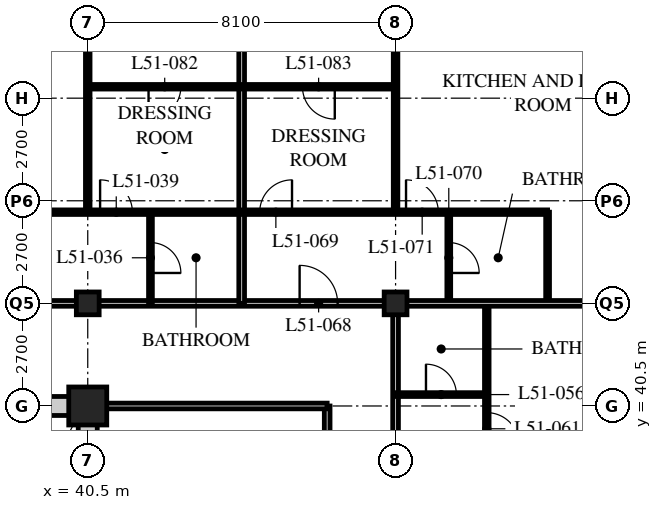
"""IFC4 building model, lengths in metres.
Left out: names, types, materials, properties, quantities, classifications, styles, units other than length and angle.
Written with IfcOpenShell. Run it as: python <this file> out.ifc"""

import sys

from ifc_helpers import new_model, si_unit, direction, frame, frame_2d, origin, origin_2d, place, context, subcontext, project, spatial, rectangle, hollow_rectangle, extrude, element, fill, save


model = new_model("IFC4")
c1 = context("Model", 3, precision=1e-05, world=origin(), true_north=direction((0.0, 1.0)))
c2 = subcontext(c1, "Body", "Model", "MODEL_VIEW")
j1 = project(units=[si_unit("LENGTHUNIT", "METRE"), si_unit("PLANEANGLEUNIT", "RADIAN")], contexts=[c1])
p1 = place(None, origin())
s1 = spatial("IfcSite", under=j1, at=p1, CompositionType="ELEMENT")
p2 = place(p1, origin())
s2 = spatial("IfcBuilding", under=s1, at=p2, CompositionType="ELEMENT")
p3 = place(p2, frame((0.0, 0.0, 199.2)))
s3 = spatial("IfcBuildingStorey", under=s2, at=p3, CompositionType="ELEMENT", Elevation=199.2)
p4 = place(p3, frame((40.5, 40.5, 0.0), z_axis=(0.0, 0.0, 1.0), x_axis=(1.0, 0.0, 0.0)))
e1 = element("IfcColumn", 1, at=p4, inside=s3, PredefinedType="COLUMN", context=c2, shape_type="SweptSolid", body=[
    extrude(hollow_rectangle(XDim=1.0, YDim=1.0, WallThickness=0.1, at=origin_2d()), origin(), (0.0, 0.0, 1.0), 3.6),
])
for number, where, z_axis, x_axis in (
    (2, (40.5, 43.2, 0.0), (0.0, 0.0, 1.0), (1.0, 0.0, 0.0)),
    (3, (48.6, 43.2, 0.0), (0.0, 0.0, 1.0), (1.0, 0.0, 0.0)),
):
    element("IfcColumn", number, at=place(p3, frame(where, z_axis=z_axis, x_axis=x_axis)), inside=s3, PredefinedType="COLUMN", context=c2, shape_type="SweptSolid", body=[
        extrude(hollow_rectangle(XDim=0.6, YDim=0.6, WallThickness=0.05, at=origin_2d()), origin(), (0.0, 0.0, 1.0), 3.6),
    ])
p5 = place(p3, frame((8.1, 43.2, 0.0), z_axis=(0.0, 0.0, 1.0), x_axis=(1.0, 0.0, 0.0)))
e4 = element("IfcWall", 4, at=p5, inside=s3, PredefinedType="PARTITIONING", context=c2, shape_type="SweptSolid", body=[
    extrude(rectangle(XDim=40.5, YDim=0.15, at=frame_2d((20.25, 0.0))), origin(), (0.0, 0.0, 1.0), 2.778),
])
p6 = place(p5, frame((4.45, 0.0, 0.0)))
e5 = element("IfcOpeningElement", 5, at=p6, cuts=e4, PredefinedType="OPENING", context=c2, shape_type="SweptSolid", body=[
    extrude(rectangle(XDim=1.0, YDim=2.1, at=frame_2d((0.5, 1.05))), frame((0.0, 0.085, 0.0), z_axis=(0.0, -1.0, 0.0), x_axis=(1.0, 0.0, 0.0)), (0.0, 0.0, 1.0), 0.17),
])
p7 = place(p5, frame((20.65, 0.0, 0.0)))
e6 = element("IfcOpeningElement", 6, at=p7, cuts=e4, PredefinedType="OPENING", context=c2, shape_type="SweptSolid", body=[
    extrude(rectangle(XDim=1.0, YDim=2.1, at=frame_2d((0.5, 1.05))), frame((0.0, 0.085, 0.0), z_axis=(0.0, -1.0, 0.0), x_axis=(1.0, 0.0, 0.0)), (0.0, 0.0, 1.0), 0.17),
])
p8 = place(p5, frame((28.75, 0.0, 0.0)))
e7 = element("IfcOpeningElement", 7, at=p8, cuts=e4, PredefinedType="OPENING", context=c2, shape_type="SweptSolid", body=[
    extrude(rectangle(XDim=1.0, YDim=2.1, at=frame_2d((0.5, 1.05))), frame((0.0, 0.085, 0.0), z_axis=(0.0, -1.0, 0.0), x_axis=(1.0, 0.0, 0.0)), (0.0, 0.0, 1.0), 0.17),
])
p9 = place(p5, frame((37.975, 0.0, 0.0)))
e8 = element("IfcOpeningElement", 8, at=p9, cuts=e4, PredefinedType="OPENING", context=c2, shape_type="SweptSolid", body=[
    extrude(rectangle(XDim=1.0, YDim=2.1, at=frame_2d((0.5, 1.05))), frame((0.0, 0.085, 0.0), z_axis=(0.0, -1.0, 0.0), x_axis=(1.0, 0.0, 0.0)), (0.0, 0.0, 1.0), 0.17),
])
p10 = place(p5, frame((1.525, 0.0, 0.0)))
e9 = element("IfcOpeningElement", 9, at=p10, cuts=e4, PredefinedType="OPENING", context=c2, shape_type="SweptSolid", body=[
    extrude(rectangle(XDim=1.0, YDim=2.1, at=frame_2d((0.5, 1.05))), frame((0.0, 0.085, 0.0), z_axis=(0.0, -1.0, 0.0), x_axis=(1.0, 0.0, 0.0)), (0.0, 0.0, 1.0), 0.17),
])
p11 = place(p3, frame((48.6, 18.9, 0.0), z_axis=(0.0, 0.0, 1.0), x_axis=(0.0, 1.0, 0.0)))
e10 = element("IfcWall", 10, at=p11, inside=s3, PredefinedType="PARTITIONING", context=c2, shape_type="SweptSolid", body=[
    extrude(rectangle(XDim=24.3, YDim=0.15, at=frame_2d((12.15, 0.0))), origin(), (0.0, 0.0, 1.0), 2.778),
])
p12 = place(p11, frame((2.35, 0.0, 0.0)))
e11 = element("IfcOpeningElement", 11, at=p12, cuts=e10, PredefinedType="OPENING", context=c2, shape_type="SweptSolid", body=[
    extrude(rectangle(XDim=1.0, YDim=2.1, at=frame_2d((0.5, 1.05))), frame((0.0, 0.085, 0.0), z_axis=(0.0, -1.0, 0.0), x_axis=(1.0, 0.0, 0.0)), (0.0, 0.0, 1.0), 0.17),
])
p13 = place(p11, frame((4.75, 0.0, 0.0)))
e12 = element("IfcOpeningElement", 12, at=p13, cuts=e10, PredefinedType="OPENING", context=c2, shape_type="SweptSolid", body=[
    extrude(rectangle(XDim=1.0, YDim=2.1, at=frame_2d((0.5, 1.05))), frame((0.0, 0.085, 0.0), z_axis=(0.0, -1.0, 0.0), x_axis=(1.0, 0.0, 0.0)), (0.0, 0.0, 1.0), 0.17),
])
p14 = place(p11, frame((9.0, 0.0, 0.0)))
e13 = element("IfcOpeningElement", 13, at=p14, cuts=e10, PredefinedType="OPENING", context=c2, shape_type="SweptSolid", body=[
    extrude(rectangle(XDim=1.0, YDim=2.1, at=frame_2d((0.5, 1.05))), frame((0.0, 0.085, 0.0), z_axis=(0.0, -1.0, 0.0), x_axis=(1.0, 0.0, 0.0)), (0.0, 0.0, 1.0), 0.17),
])
p15 = place(p3, frame((46.8, 20.7, 0.0), z_axis=(0.0, 0.0, 1.0), x_axis=(0.0, 1.0, 0.0)))
e14 = element("IfcWall", 14, at=p15, inside=s3, PredefinedType="PARTITIONING", context=c2, shape_type="SweptSolid", body=[
    extrude(rectangle(XDim=19.8, YDim=0.15, at=frame_2d((9.9, 0.0))), origin(), (0.0, 0.0, 1.0), 3.39),
])
p16 = place(p15, frame((4.052, 0.0, 0.0)))
e15 = element("IfcOpeningElement", 15, at=p16, cuts=e14, PredefinedType="OPENING", context=c2, shape_type="SweptSolid", body=[
    extrude(rectangle(XDim=1.0, YDim=2.1, at=frame_2d((0.5, 1.05))), frame((0.0, 0.085, 0.0), z_axis=(0.0, -1.0, 0.0), x_axis=(1.0, 0.0, 0.0)), (0.0, 0.0, 1.0), 0.17),
])
p17 = place(p15, frame((8.102, 0.0, 0.0)))
e16 = element("IfcOpeningElement", 16, at=p17, cuts=e14, PredefinedType="OPENING", context=c2, shape_type="SweptSolid", body=[
    extrude(rectangle(XDim=1.0, YDim=2.1, at=frame_2d((0.5, 1.05))), frame((0.0, 0.085, 0.0), z_axis=(0.0, -1.0, 0.0), x_axis=(1.0, 0.0, 0.0)), (0.0, 0.0, 1.0), 0.17),
])
p18 = place(p15, frame((13.502, 0.0, 0.0)))
e17 = element("IfcOpeningElement", 17, at=p18, cuts=e14, PredefinedType="OPENING", context=c2, shape_type="SweptSolid", body=[
    extrude(rectangle(XDim=1.0, YDim=2.1, at=frame_2d((0.5, 1.05))), frame((0.0, 0.085, 0.0), z_axis=(0.0, -1.0, 0.0), x_axis=(1.0, 0.0, 0.0)), (0.0, 0.0, 1.0), 0.17),
])
p19 = place(p15, frame((17.552, 0.0, 0.0)))
e18 = element("IfcOpeningElement", 18, at=p19, cuts=e14, PredefinedType="OPENING", context=c2, shape_type="SweptSolid", body=[
    extrude(rectangle(XDim=1.0, YDim=2.1, at=frame_2d((0.5, 1.05))), frame((0.0, 0.085, 0.0), z_axis=(0.0, -1.0, 0.0), x_axis=(1.0, 0.0, 0.0)), (0.0, 0.0, 1.0), 0.17),
])
p20 = place(p3, frame((46.8, 40.5, 0.0), z_axis=(0.0, 0.0, 1.0), x_axis=(-1.0, 0.0, 0.0)))
e19 = element("IfcWall", 19, at=p20, inside=s3, PredefinedType="PARTITIONING", context=c2, shape_type="SweptSolid", body=[
    extrude(rectangle(XDim=6.1, YDim=0.15, at=frame_2d((3.05, 0.0))), origin(), (0.0, 0.0, 1.0), 3.39),
])
p21 = place(p3, frame((42.15, 43.2, 0.0), z_axis=(0.0, 0.0, 1.0), x_axis=(0.0, 1.0, 0.0)))
e20 = element("IfcWall", 20, at=p21, inside=s3, PredefinedType="PARTITIONING", context=c2, shape_type="SweptSolid", body=[
    extrude(rectangle(XDim=2.4, YDim=0.1, at=frame_2d((1.2, 0.0))), origin(), (0.0, 0.0, 1.0), 3.39),
])
p22 = place(p21, frame((0.8, 0.0, 0.0)))
e21 = element("IfcOpeningElement", 21, at=p22, cuts=e20, PredefinedType="OPENING", context=c2, shape_type="SweptSolid", body=[
    extrude(rectangle(XDim=0.8, YDim=2.1, at=frame_2d((0.4, 1.05))), frame((0.0, 0.06, 0.0), z_axis=(0.0, -1.0, 0.0), x_axis=(1.0, 0.0, 0.0)), (0.0, 0.0, 1.0), 0.12),
])
p23 = place(p3, frame((40.5, 45.6, 0.0), z_axis=(0.0, 0.0, 1.0), x_axis=(0.0, 1.0, 0.0)))
e22 = element("IfcWall", 22, at=p23, inside=s3, PredefinedType="PARTITIONING", context=c2, shape_type="SweptSolid", body=[
    extrude(rectangle(XDim=13.5, YDim=0.12, at=frame_2d((6.75, 0.0))), origin(), (0.0, 0.0, 1.0), 2.778),
])
p24 = place(p3, frame((51.0, 27.0, 0.0), z_axis=(0.0, 0.0, 1.0), x_axis=(0.0, 1.0, 0.0)))
e23 = element("IfcWall", 23, at=p24, inside=s3, PredefinedType="PARTITIONING", context=c2, shape_type="SweptSolid", body=[
    extrude(rectangle(XDim=16.2, YDim=0.12, at=frame_2d((8.1, 0.0))), origin(), (0.0, 0.0, 1.0), 3.39),
])
p25 = place(p24, frame((0.975, 0.0, 0.0)))
e24 = element("IfcOpeningElement", 24, at=p25, cuts=e23, PredefinedType="OPENING", context=c2, shape_type="SweptSolid", body=[
    extrude(rectangle(XDim=0.85, YDim=2.1, at=frame_2d((0.425, 1.05))), frame((0.0, 0.07, 0.0), z_axis=(0.0, -1.0, 0.0), x_axis=(1.0, 0.0, 0.0)), (0.0, 0.0, 1.0), 0.14),
])
p26 = place(p24, frame((8.425, 0.0, 0.0)))
e25 = element("IfcOpeningElement", 25, at=p26, cuts=e23, PredefinedType="OPENING", context=c2, shape_type="SweptSolid", body=[
    extrude(rectangle(XDim=0.85, YDim=2.1, at=frame_2d((0.425, 1.05))), frame((0.0, 0.07, 0.0), z_axis=(0.0, -1.0, 0.0), x_axis=(1.0, 0.0, 0.0)), (0.0, 0.0, 1.0), 0.14),
])
p27 = place(p24, frame((12.475, 0.0, 0.0)))
e26 = element("IfcOpeningElement", 26, at=p27, cuts=e23, PredefinedType="OPENING", context=c2, shape_type="SweptSolid", body=[
    extrude(rectangle(XDim=0.85, YDim=2.1, at=frame_2d((0.425, 1.05))), frame((0.0, 0.07, 0.0), z_axis=(0.0, -1.0, 0.0), x_axis=(1.0, 0.0, 0.0)), (0.0, 0.0, 1.0), 0.14),
])
p28 = place(p3, frame((48.6, 40.8, 0.0), z_axis=(0.0, 0.0, 1.0), x_axis=(1.0, 0.0, 0.0)))
e27 = element("IfcWall", 27, at=p28, inside=s3, PredefinedType="PARTITIONING", context=c2, shape_type="SweptSolid", body=[
    extrude(rectangle(XDim=2.4, YDim=0.1, at=frame_2d((1.2, 0.0))), origin(), (0.0, 0.0, 1.0), 3.39),
])
p29 = place(p28, frame((0.8, 0.0, 0.0)))
e28 = element("IfcOpeningElement", 28, at=p29, cuts=e27, PredefinedType="OPENING", context=c2, shape_type="SweptSolid", body=[
    extrude(rectangle(XDim=0.8, YDim=2.1, at=frame_2d((0.4, 1.05))), frame((0.0, 0.06, 0.0), z_axis=(0.0, -1.0, 0.0), x_axis=(1.0, 0.0, 0.0)), (0.0, 0.0, 1.0), 0.12),
])
p30 = place(p3, frame((50.0, 43.2, 0.0), z_axis=(0.0, 0.0, 1.0), x_axis=(0.0, 1.0, 0.0)))
e29 = element("IfcWall", 29, at=p30, inside=s3, PredefinedType="PARTITIONING", context=c2, shape_type="SweptSolid", body=[
    extrude(rectangle(XDim=2.4, YDim=0.1, at=frame_2d((1.2, 0.0))), origin(), (0.0, 0.0, 1.0), 3.39),
])
p31 = place(p30, frame((0.8, 0.0, 0.0)))
e30 = element("IfcOpeningElement", 30, at=p31, cuts=e29, PredefinedType="OPENING", context=c2, shape_type="SweptSolid", body=[
    extrude(rectangle(XDim=0.8, YDim=2.1, at=frame_2d((0.4, 1.05))), frame((0.0, 0.06, 0.0), z_axis=(0.0, -1.0, 0.0), x_axis=(1.0, 0.0, 0.0)), (0.0, 0.0, 1.0), 0.12),
])
p32 = place(p3, frame((52.6, 43.2, 0.0), z_axis=(0.0, 0.0, 1.0), x_axis=(0.0, 1.0, 0.0)))
e31 = element("IfcWall", 31, at=p32, inside=s3, PredefinedType="PARTITIONING", context=c2, shape_type="SweptSolid", body=[
    extrude(rectangle(XDim=2.4, YDim=0.1, at=frame_2d((1.2, 0.0))), origin(), (0.0, 0.0, 1.0), 3.39),
])
p33 = place(p3, frame((48.6, 45.6, 0.0), z_axis=(0.0, 0.0, 1.0), x_axis=(0.0, 1.0, 0.0)))
e32 = element("IfcWall", 32, at=p33, inside=s3, PredefinedType="PARTITIONING", context=c2, shape_type="SweptSolid", body=[
    extrude(rectangle(XDim=9.45, YDim=0.12, at=frame_2d((4.725, 0.0))), origin(), (0.0, 0.0, 1.0), 2.778),
])
p34 = place(p3, frame((48.6, 43.2, 0.0), z_axis=(0.0, 0.0, 1.0), x_axis=(1.0, 0.0, 0.0)))
e33 = element("IfcWall", 33, at=p34, inside=s3, PredefinedType="PARTITIONING", context=c2, shape_type="SweptSolid", body=[
    extrude(rectangle(XDim=7.8, YDim=0.15, at=frame_2d((3.9, 0.0))), origin(), (0.0, 0.0, 1.0), 2.778),
])
p35 = place(p3, frame((44.55, 43.2, 0.0), z_axis=(0.0, 0.0, 1.0), x_axis=(0.0, 1.0, 0.0)))
e34 = element("IfcWall", 34, at=p35, inside=s3, PredefinedType="PARTITIONING", context=c2, shape_type="SweptSolid", body=[
    extrude(rectangle(XDim=15.9, YDim=0.15, at=frame_2d((7.95, 0.0))), origin(), (0.0, 0.0, 1.0), 3.39),
])
p36 = place(p3, frame((4.1, 45.6, 0.0), z_axis=(0.0, 0.0, 1.0), x_axis=(1.0, 0.0, 0.0)))
e35 = element("IfcWall", 35, at=p36, inside=s3, PredefinedType="PARTITIONING", context=c2, shape_type="SweptSolid", body=[
    extrude(rectangle(XDim=48.5, YDim=0.12, at=frame_2d((24.25, 0.0))), origin(), (0.0, 0.0, 1.0), 3.39),
])
p37 = place(p36, frame((9.025, 0.0, 0.0)))
e36 = element("IfcOpeningElement", 36, at=p37, cuts=e35, PredefinedType="OPENING", context=c2, shape_type="SweptSolid", body=[
    extrude(rectangle(XDim=0.85, YDim=2.1, at=frame_2d((0.425, 1.05))), frame((0.0, 0.07, 0.0), z_axis=(0.0, -1.0, 0.0), x_axis=(1.0, 0.0, 0.0)), (0.0, 0.0, 1.0), 0.14),
])
p38 = place(p36, frame((16.475, 0.0, 0.0)))
e37 = element("IfcOpeningElement", 37, at=p38, cuts=e35, PredefinedType="OPENING", context=c2, shape_type="SweptSolid", body=[
    extrude(rectangle(XDim=0.85, YDim=2.1, at=frame_2d((0.425, 1.05))), frame((0.0, 0.07, 0.0), z_axis=(0.0, -1.0, 0.0), x_axis=(1.0, 0.0, 0.0)), (0.0, 0.0, 1.0), 0.14),
])
p39 = place(p36, frame((20.525, 0.0, 0.0)))
e38 = element("IfcOpeningElement", 38, at=p39, cuts=e35, PredefinedType="OPENING", context=c2, shape_type="SweptSolid", body=[
    extrude(rectangle(XDim=0.85, YDim=2.1, at=frame_2d((0.425, 1.05))), frame((0.0, 0.07, 0.0), z_axis=(0.0, -1.0, 0.0), x_axis=(1.0, 0.0, 0.0)), (0.0, 0.0, 1.0), 0.14),
])
p40 = place(p36, frame((25.225, 0.0, 0.0)))
e39 = element("IfcOpeningElement", 39, at=p40, cuts=e35, PredefinedType="OPENING", context=c2, shape_type="SweptSolid", body=[
    extrude(rectangle(XDim=0.85, YDim=2.1, at=frame_2d((0.425, 1.05))), frame((0.0, 0.07, 0.0), z_axis=(0.0, -1.0, 0.0), x_axis=(1.0, 0.0, 0.0)), (0.0, 0.0, 1.0), 0.14),
])
p41 = place(p36, frame((28.625, 0.0, 0.0)))
e40 = element("IfcOpeningElement", 40, at=p41, cuts=e35, PredefinedType="OPENING", context=c2, shape_type="SweptSolid", body=[
    extrude(rectangle(XDim=0.85, YDim=2.1, at=frame_2d((0.425, 1.05))), frame((0.0, 0.07, 0.0), z_axis=(0.0, -1.0, 0.0), x_axis=(1.0, 0.0, 0.0)), (0.0, 0.0, 1.0), 0.14),
])
p42 = place(p36, frame((33.325, 0.0, 0.0)))
e41 = element("IfcOpeningElement", 41, at=p42, cuts=e35, PredefinedType="OPENING", context=c2, shape_type="SweptSolid", body=[
    extrude(rectangle(XDim=0.85, YDim=2.1, at=frame_2d((0.425, 1.05))), frame((0.0, 0.07, 0.0), z_axis=(0.0, -1.0, 0.0), x_axis=(1.0, 0.0, 0.0)), (0.0, 0.0, 1.0), 0.14),
])
p43 = place(p36, frame((36.725, 0.0, 0.0)))
e42 = element("IfcOpeningElement", 42, at=p43, cuts=e35, PredefinedType="OPENING", context=c2, shape_type="SweptSolid", body=[
    extrude(rectangle(XDim=0.85, YDim=2.1, at=frame_2d((0.425, 1.05))), frame((0.0, 0.07, 0.0), z_axis=(0.0, -1.0, 0.0), x_axis=(1.0, 0.0, 0.0)), (0.0, 0.0, 1.0), 0.14),
])
p44 = place(p36, frame((40.925, 0.0, 0.0)))
e43 = element("IfcOpeningElement", 43, at=p44, cuts=e35, PredefinedType="OPENING", context=c2, shape_type="SweptSolid", body=[
    extrude(rectangle(XDim=0.85, YDim=2.1, at=frame_2d((0.425, 1.05))), frame((0.0, 0.07, 0.0), z_axis=(0.0, -1.0, 0.0), x_axis=(1.0, 0.0, 0.0)), (0.0, 0.0, 1.0), 0.14),
])
p45 = place(p36, frame((44.775, 0.0, 0.0)))
e44 = element("IfcOpeningElement", 44, at=p45, cuts=e35, PredefinedType="OPENING", context=c2, shape_type="SweptSolid", body=[
    extrude(rectangle(XDim=0.85, YDim=2.1, at=frame_2d((0.425, 1.05))), frame((0.0, 0.07, 0.0), z_axis=(0.0, -1.0, 0.0), x_axis=(1.0, 0.0, 0.0)), (0.0, 0.0, 1.0), 0.14),
])
p46 = place(p36, frame((6.725, 0.0, 0.0)))
e45 = element("IfcOpeningElement", 45, at=p46, cuts=e35, PredefinedType="OPENING", context=c2, shape_type="SweptSolid", body=[
    extrude(rectangle(XDim=0.85, YDim=2.1, at=frame_2d((0.425, 1.05))), frame((0.0, 0.07, 0.0), z_axis=(0.0, -1.0, 0.0), x_axis=(1.0, 0.0, 0.0)), (0.0, 0.0, 1.0), 0.14),
])
p47 = place(p36, frame((2.875, 0.0, 0.0)))
e46 = element("IfcOpeningElement", 46, at=p47, cuts=e35, PredefinedType="OPENING", context=c2, shape_type="SweptSolid", body=[
    extrude(rectangle(XDim=0.85, YDim=2.1, at=frame_2d((0.425, 1.05))), frame((0.0, 0.07, 0.0), z_axis=(0.0, -1.0, 0.0), x_axis=(1.0, 0.0, 0.0)), (0.0, 0.0, 1.0), 0.14),
])
p48 = place(p3, frame((40.5, 48.9, 0.0), z_axis=(0.0, 0.0, 1.0), x_axis=(1.0, 0.0, 0.0)))
e47 = element("IfcWall", 47, at=p48, inside=s3, PredefinedType="PARTITIONING", context=c2, shape_type="SweptSolid", body=[
    extrude(rectangle(XDim=8.1, YDim=0.12, at=frame_2d((4.05, 0.0))), origin(), (0.0, 0.0, 1.0), 3.39),
])
p49 = place(p48, frame((1.6, 0.0, 0.0)))
e48 = element("IfcOpeningElement", 48, at=p49, cuts=e47, PredefinedType="OPENING", context=c2, shape_type="SweptSolid", body=[
    extrude(rectangle(XDim=0.85, YDim=2.1, at=frame_2d((0.425, 1.05))), frame((0.0, 0.07, 0.0), z_axis=(0.0, -1.0, 0.0), x_axis=(1.0, 0.0, 0.0)), (0.0, 0.0, 1.0), 0.14),
])
p50 = place(p48, frame((5.65, 0.0, 0.0)))
e49 = element("IfcOpeningElement", 49, at=p50, cuts=e47, PredefinedType="OPENING", context=c2, shape_type="SweptSolid", body=[
    extrude(rectangle(XDim=0.85, YDim=2.1, at=frame_2d((0.425, 1.05))), frame((0.0, 0.07, 0.0), z_axis=(0.0, -1.0, 0.0), x_axis=(1.0, 0.0, 0.0)), (0.0, 0.0, 1.0), 0.14),
])
p51 = place(p3, frame((15.95, 40.5, 0.0), z_axis=(0.0, 0.0, 1.0), x_axis=(1.0, 0.0, 0.0)))
e50 = element("IfcWall", 50, at=p51, inside=s3, PredefinedType="SOLIDWALL", context=c2, shape_type="SweptSolid", body=[
    extrude(rectangle(XDim=24.8, YDim=0.5, at=frame_2d((12.4, 0.0))), origin(), (0.0, 0.0, 1.0), 2.74),
])
p52 = place(p51, frame((11.5, 0.0, 0.0)))
e51 = element("IfcOpeningElement", 51, at=p52, cuts=e50, PredefinedType="OPENING", context=c2, shape_type="SweptSolid", body=[
    extrude(rectangle(XDim=1.8, YDim=2.4, at=frame_2d((0.9, 1.2))), frame((0.0, 0.26, 0.0), z_axis=(0.0, -1.0, 0.0), x_axis=(1.0, 0.0, 0.0)), (0.0, 0.0, 1.0), 0.52),
])
p53 = place(p3, frame((40.5, 24.55, 0.0), z_axis=(0.0, 0.0, 1.0), x_axis=(0.0, 1.0, 0.0)))
e52 = element("IfcWall", 52, at=p53, inside=s3, PredefinedType="SOLIDWALL", context=c2, shape_type="SweptSolid", body=[
    extrude(rectangle(XDim=15.7, YDim=0.5, at=frame_2d((7.85, 0.0))), origin(), (0.0, 0.0, 1.0), 2.778),
])
p54 = place(p22, origin())
e53 = element("IfcDoor", 53, at=p54, inside=s3, OperationType="SINGLE_SWING_RIGHT", PredefinedType="DOOR", context=c2, shape_type="SweptSolid", body=[
    extrude(rectangle(XDim=0.8, YDim=2.1, at=frame_2d((0.4, 1.05))), frame((0.0, 0.025, 0.0), z_axis=(0.0, -1.0, 0.0), x_axis=(1.0, 0.0, 0.0)), (0.0, 0.0, 1.0), 0.05),
])
fill(e21, e53)
p55 = place(p43, origin())
e54 = element("IfcDoor", 54, at=p55, inside=s3, OperationType="SINGLE_SWING_LEFT", PredefinedType="DOOR", context=c2, shape_type="SweptSolid", body=[
    extrude(rectangle(XDim=0.85, YDim=2.1, at=frame_2d((0.425, 1.05))), frame((0.0, 0.025, 0.0), z_axis=(0.0, -1.0, 0.0), x_axis=(1.0, 0.0, 0.0)), (0.0, 0.0, 1.0), 0.05),
])
fill(e42, e54)
p56 = place(p29, origin())
e55 = element("IfcDoor", 55, at=p56, inside=s3, OperationType="SINGLE_SWING_LEFT", PredefinedType="DOOR", context=c2, shape_type="SweptSolid", body=[
    extrude(rectangle(XDim=0.8, YDim=2.1, at=frame_2d((0.4, 1.05))), frame((0.0, 0.025, 0.0), z_axis=(0.0, -1.0, 0.0), x_axis=(1.0, 0.0, 0.0)), (0.0, 0.0, 1.0), 0.05),
])
fill(e28, e55)
p57 = place(p27, origin())
e56 = element("IfcDoor", 56, at=p57, inside=s3, OperationType="SINGLE_SWING_RIGHT", PredefinedType="DOOR", context=c2, shape_type="SweptSolid", body=[
    extrude(rectangle(XDim=0.85, YDim=2.1, at=frame_2d((0.425, 1.05))), frame((0.0, 0.025, 0.0), z_axis=(0.0, -1.0, 0.0), x_axis=(1.0, 0.0, 0.0)), (0.0, 0.0, 1.0), 0.05),
])
fill(e26, e56)
p58 = place(p9, origin())
e57 = element("IfcDoor", 57, at=p58, inside=s3, OperationType="SINGLE_SWING_LEFT", PredefinedType="DOOR", context=c2, shape_type="SweptSolid", body=[
    extrude(rectangle(XDim=1.0, YDim=2.1, at=frame_2d((0.5, 1.05))), frame((0.0, 0.025, 0.0), z_axis=(0.0, -1.0, 0.0), x_axis=(1.0, 0.0, 0.0)), (0.0, 0.0, 1.0), 0.05),
])
fill(e8, e57)
p59 = place(p44, origin())
e58 = element("IfcDoor", 58, at=p59, inside=s3, OperationType="SINGLE_SWING_RIGHT", PredefinedType="DOOR", context=c2, shape_type="SweptSolid", body=[
    extrude(rectangle(XDim=0.85, YDim=2.1, at=frame_2d((0.425, 1.05))), frame((0.0, 0.025, 0.0), z_axis=(0.0, -1.0, 0.0), x_axis=(1.0, 0.0, 0.0)), (0.0, 0.0, 1.0), 0.05),
])
fill(e43, e58)
p60 = place(p31, origin())
e59 = element("IfcDoor", 59, at=p60, inside=s3, OperationType="SINGLE_SWING_RIGHT", PredefinedType="DOOR", context=c2, shape_type="SweptSolid", body=[
    extrude(rectangle(XDim=0.8, YDim=2.1, at=frame_2d((0.4, 1.05))), frame((0.0, 0.025, 0.0), z_axis=(0.0, -1.0, 0.0), x_axis=(1.0, 0.0, 0.0)), (0.0, 0.0, 1.0), 0.05),
])
fill(e30, e59)
p61 = place(p45, origin())
e60 = element("IfcDoor", 60, at=p61, inside=s3, OperationType="SINGLE_SWING_LEFT", PredefinedType="DOOR", context=c2, shape_type="SweptSolid", body=[
    extrude(rectangle(XDim=0.85, YDim=2.1, at=frame_2d((0.425, 1.05))), frame((0.0, 0.025, 0.0), z_axis=(0.0, -1.0, 0.0), x_axis=(1.0, 0.0, 0.0)), (0.0, 0.0, 1.0), 0.05),
])
fill(e44, e60)
p62 = place(p49, origin())
e61 = element("IfcDoor", 61, at=p62, inside=s3, OperationType="SINGLE_SWING_RIGHT", PredefinedType="DOOR", context=c2, shape_type="SweptSolid", body=[
    extrude(rectangle(XDim=0.85, YDim=2.1, at=frame_2d((0.425, 1.05))), frame((0.0, 0.025, 0.0), z_axis=(0.0, -1.0, 0.0), x_axis=(1.0, 0.0, 0.0)), (0.0, 0.0, 1.0), 0.05),
])
fill(e48, e61)
p63 = place(p50, origin())
e62 = element("IfcDoor", 62, at=p63, inside=s3, OperationType="SINGLE_SWING_LEFT", PredefinedType="DOOR", context=c2, shape_type="SweptSolid", body=[
    extrude(rectangle(XDim=0.85, YDim=2.1, at=frame_2d((0.425, 1.05))), frame((0.0, 0.025, 0.0), z_axis=(0.0, -1.0, 0.0), x_axis=(1.0, 0.0, 0.0)), (0.0, 0.0, 1.0), 0.05),
])
fill(e49, e62)
save(model, sys.argv[1])
